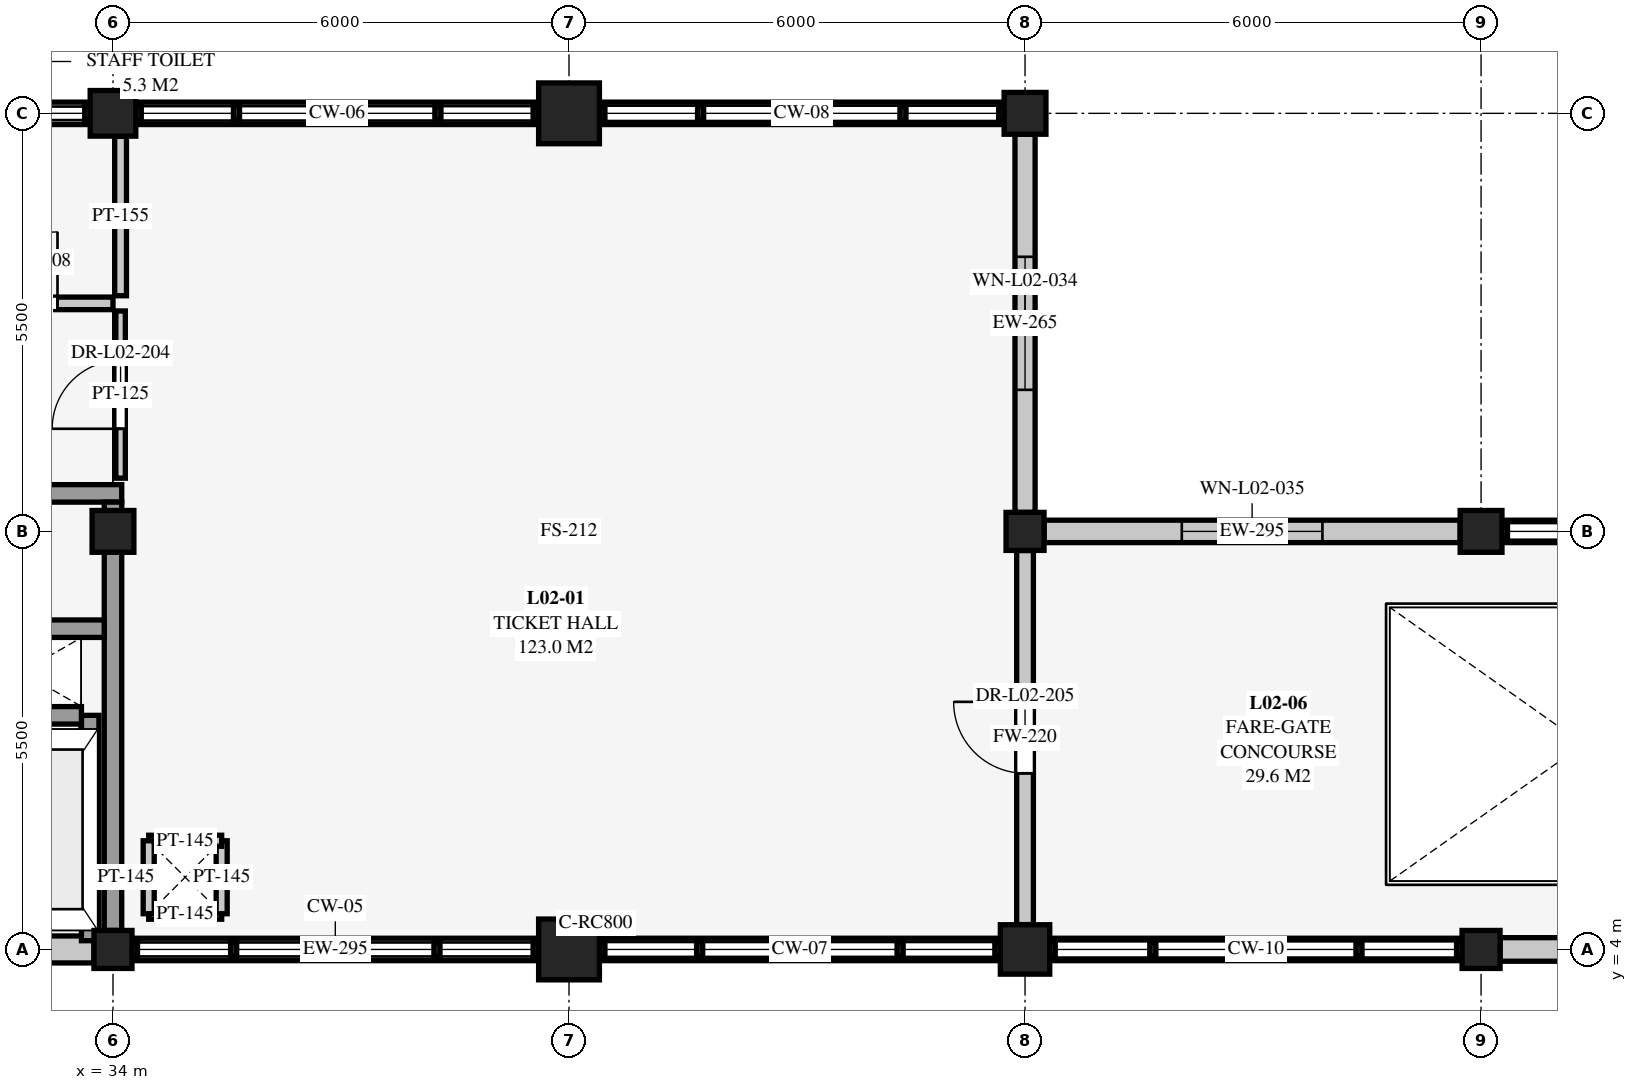
"""IFC4 building model, lengths in metres.
Left out: names, types, materials, properties, quantities, classifications, styles, units other than length and angle.
Written with IfcOpenShell. Run it as: python <this file> out.ifc"""

import sys

from ifc_helpers import new_model, si_unit, direction, frame, frame_2d, origin, origin_2d, place, context, subcontext, project, spatial, rectangle, extrude, element, fill, save


model = new_model("IFC4")
c1 = context("Model", 3, precision=1e-05, world=origin(), true_north=direction((0.0, 1.0)))
c2 = subcontext(c1, "Body", "Model", "MODEL_VIEW")
j1 = project(units=[si_unit("LENGTHUNIT", "METRE"), si_unit("PLANEANGLEUNIT", "RADIAN")], contexts=[c1])
p1 = place(None, origin())
s1 = spatial("IfcSite", under=j1, at=p1, CompositionType="ELEMENT")
p2 = place(p1, origin())
s2 = spatial("IfcBuilding", under=s1, at=p2, CompositionType="ELEMENT")
p3 = place(p2, frame((0.0, 0.0, 4.5)))
s3 = spatial("IfcBuildingStorey", under=s2, at=p3, CompositionType="ELEMENT", Elevation=4.5)
p4 = place(p3, frame((34.0, 4.0, 0.0), z_axis=(0.0, 0.0, 1.0), x_axis=(1.0, 0.0, 0.0)))
e1 = element("IfcColumn", 1, at=p4, inside=s3, PredefinedType="COLUMN", context=c2, shape_type="SweptSolid", body=[
    extrude(rectangle(XDim=0.5, YDim=0.5, at=origin_2d()), origin(), (0.0, 0.0, 1.0), 4.5),
])
p5 = place(p3, frame((34.0, 9.5, 0.0), z_axis=(0.0, 0.0, 1.0), x_axis=(1.0, 0.0, 0.0)))
e2 = element("IfcColumn", 2, at=p5, inside=s3, PredefinedType="COLUMN", context=c2, shape_type="SweptSolid", body=[
    extrude(rectangle(XDim=0.55, YDim=0.55, at=origin_2d()), origin(), (0.0, 0.0, 1.0), 4.5),
])
p6 = place(p3, frame((34.0, 15.0, 0.0), z_axis=(0.0, 0.0, 1.0), x_axis=(1.0, 0.0, 0.0)))
e3 = element("IfcColumn", 3, at=p6, inside=s3, PredefinedType="COLUMN", context=c2, shape_type="SweptSolid", body=[
    extrude(rectangle(XDim=0.6, YDim=0.6, at=origin_2d()), origin(), (0.0, 0.0, 1.0), 4.5),
])
for number, where, z_axis, x_axis in (
    (4, (40.0, 4.0, 0.0), (0.0, 0.0, 1.0), (1.0, 0.0, 0.0)),
    (5, (40.0, 15.0, 0.0), (0.0, 0.0, 1.0), (1.0, 0.0, 0.0)),
):
    element("IfcColumn", number, at=place(p3, frame(where, z_axis=z_axis, x_axis=x_axis)), inside=s3, PredefinedType="COLUMN", context=c2, shape_type="SweptSolid", body=[
        extrude(rectangle(XDim=0.8, YDim=0.8, at=origin_2d()), origin(), (0.0, 0.0, 1.0), 4.5),
    ])
p7 = place(p3, frame((46.0, 4.0, 0.0), z_axis=(0.0, 0.0, 1.0), x_axis=(1.0, 0.0, 0.0)))
e6 = element("IfcColumn", 6, at=p7, inside=s3, PredefinedType="COLUMN", context=c2, shape_type="SweptSolid", body=[
    extrude(rectangle(XDim=0.65, YDim=0.65, at=origin_2d()), origin(), (0.0, 0.0, 1.0), 4.5),
])
p8 = place(p3, frame((46.0, 9.5, 0.0), z_axis=(0.0, 0.0, 1.0), x_axis=(1.0, 0.0, 0.0)))
e7 = element("IfcColumn", 7, at=p8, inside=s3, PredefinedType="COLUMN", context=c2, shape_type="SweptSolid", body=[
    extrude(rectangle(XDim=0.5, YDim=0.5, at=origin_2d()), origin(), (0.0, 0.0, 1.0), 4.5),
])
p9 = place(p3, frame((46.0, 15.0, 0.0), z_axis=(0.0, 0.0, 1.0), x_axis=(1.0, 0.0, 0.0)))
e8 = element("IfcColumn", 8, at=p9, inside=s3, PredefinedType="COLUMN", context=c2, shape_type="SweptSolid", body=[
    extrude(rectangle(XDim=0.55, YDim=0.55, at=origin_2d()), origin(), (0.0, 0.0, 1.0), 4.5),
])
p10 = place(p3, frame((52.0, 4.0, 0.0), z_axis=(0.0, 0.0, 1.0), x_axis=(1.0, 0.0, 0.0)))
e9 = element("IfcColumn", 9, at=p10, inside=s3, PredefinedType="COLUMN", context=c2, shape_type="SweptSolid", body=[
    extrude(rectangle(XDim=0.5, YDim=0.5, at=origin_2d()), origin(), (0.0, 0.0, 1.0), 4.5),
])
p11 = place(p3, frame((52.0, 9.5, 0.0), z_axis=(0.0, 0.0, 1.0), x_axis=(1.0, 0.0, 0.0)))
e10 = element("IfcColumn", 10, at=p11, inside=s3, PredefinedType="COLUMN", context=c2, shape_type="SweptSolid", body=[
    extrude(rectangle(XDim=0.55, YDim=0.55, at=origin_2d()), origin(), (0.0, 0.0, 1.0), 4.5),
])
p12 = place(p3, frame((33.75, 4.0, 0.0), z_axis=(0.0, 0.0, 1.0), x_axis=(-1.0, 0.0, 0.0)))
e11 = element("IfcWall", 11, at=p12, inside=s3, PredefinedType="SOLIDWALL", context=c2, shape_type="SweptSolid", body=[
    extrude(rectangle(XDim=5.425, YDim=0.355, at=frame_2d((2.712, 0.0))), origin(), (0.0, 0.0, 1.0), 3.809),
])
p13 = place(p3, frame((28.275, 15.0, 0.0), z_axis=(0.0, 0.0, 1.0), x_axis=(1.0, 0.0, 0.0)))
e12 = element("IfcWall", 12, at=p13, inside=s3, PredefinedType="SOLIDWALL", context=c2, shape_type="SweptSolid", body=[
    extrude(rectangle(XDim=5.425, YDim=0.295, at=frame_2d((2.712, 0.0))), origin(), (0.0, 0.0, 1.0), 0.31),
])
p14 = place(p3, frame((39.6, 4.0, 0.0), z_axis=(0.0, 0.0, 1.0), x_axis=(-1.0, 0.0, 0.0)))
e13 = element("IfcWall", 13, at=p14, inside=s3, PredefinedType="SOLIDWALL", context=c2, shape_type="SweptSolid", body=[
    extrude(rectangle(XDim=5.35, YDim=0.295, at=frame_2d((2.675, 0.0))), origin(), (0.0, 0.0, 1.0), 0.36),
])
p15 = place(p3, frame((34.3, 15.0, 0.0), z_axis=(0.0, 0.0, 1.0), x_axis=(1.0, 0.0, 0.0)))
e14 = element("IfcWall", 14, at=p15, inside=s3, PredefinedType="SOLIDWALL", context=c2, shape_type="SweptSolid", body=[
    extrude(rectangle(XDim=5.3, YDim=0.295, at=frame_2d((2.65, 0.0))), origin(), (0.0, 0.0, 1.0), 0.41),
])
p16 = place(p3, frame((45.675, 4.0, 0.0), z_axis=(0.0, 0.0, 1.0), x_axis=(-1.0, 0.0, 0.0)))
e15 = element("IfcWall", 15, at=p16, inside=s3, PredefinedType="SOLIDWALL", context=c2, shape_type="SweptSolid", body=[
    extrude(rectangle(XDim=5.275, YDim=0.295, at=frame_2d((2.638, 0.0))), origin(), (0.0, 0.0, 1.0), 0.46),
])
p17 = place(p3, frame((40.4, 15.0, 0.0), z_axis=(0.0, 0.0, 1.0), x_axis=(1.0, 0.0, 0.0)))
e16 = element("IfcWall", 16, at=p17, inside=s3, PredefinedType="SOLIDWALL", context=c2, shape_type="SweptSolid", body=[
    extrude(rectangle(XDim=5.325, YDim=0.295, at=frame_2d((2.663, 0.0))), origin(), (0.0, 0.0, 1.0), 0.52),
])
p18 = place(p3, frame((46.0, 14.725, 0.0), z_axis=(0.0, 0.0, 1.0), x_axis=(0.0, -1.0, 0.0)))
e17 = element("IfcWall", 17, at=p18, inside=s3, PredefinedType="SOLIDWALL", context=c2, shape_type="SweptSolid", body=[
    extrude(rectangle(XDim=4.975, YDim=0.265, at=frame_2d((2.488, 0.0))), origin(), (0.0, 0.0, 1.0), 3.809),
])
p19 = place(p18, frame((1.613, 0.0, 0.75)))
e18 = element("IfcOpeningElement", 18, at=p19, cuts=e17, PredefinedType="OPENING", context=c2, shape_type="SweptSolid", body=[
    extrude(rectangle(XDim=1.75, YDim=2.3, at=frame_2d((0.875, 1.15))), frame((0.0, 0.142, 0.0), z_axis=(0.0, -1.0, 0.0), x_axis=(1.0, 0.0, 0.0)), (0.0, 0.0, 1.0), 0.285),
])
p20 = place(p3, frame((51.75, 4.0, 0.0), z_axis=(0.0, 0.0, 1.0), x_axis=(-1.0, 0.0, 0.0)))
e19 = element("IfcWall", 19, at=p20, inside=s3, PredefinedType="SOLIDWALL", context=c2, shape_type="SweptSolid", body=[
    extrude(rectangle(XDim=5.425, YDim=0.295, at=frame_2d((2.712, 0.0))), origin(), (0.0, 0.0, 1.0), 0.21),
])
p21 = place(p3, frame((46.25, 9.5, 0.0), z_axis=(0.0, 0.0, 1.0), x_axis=(1.0, 0.0, 0.0)))
e20 = element("IfcWall", 20, at=p21, inside=s3, PredefinedType="SOLIDWALL", context=c2, shape_type="SweptSolid", body=[
    extrude(rectangle(XDim=5.475, YDim=0.295, at=frame_2d((2.738, 0.0))), origin(), (0.0, 0.0, 1.0), 3.809),
])
p22 = place(p21, frame((1.812, 0.0, 0.7)))
e21 = element("IfcOpeningElement", 21, at=p22, cuts=e20, PredefinedType="OPENING", context=c2, shape_type="SweptSolid", body=[
    extrude(rectangle(XDim=1.85, YDim=2.35, at=frame_2d((0.925, 1.175))), frame((0.0, 0.157, 0.0), z_axis=(0.0, -1.0, 0.0), x_axis=(1.0, 0.0, 0.0)), (0.0, 0.0, 1.0), 0.315),
])
p23 = place(p3, frame((57.675, 4.0, 0.0), z_axis=(0.0, 0.0, 1.0), x_axis=(-1.0, 0.0, 0.0)))
e22 = element("IfcWall", 22, at=p23, inside=s3, PredefinedType="SOLIDWALL", context=c2, shape_type="SweptSolid", body=[
    extrude(rectangle(XDim=5.425, YDim=0.31, at=frame_2d((2.712, 0.0))), origin(), (0.0, 0.0, 1.0), 3.857),
])
p24 = place(p23, frame((1.738, 0.0, 0.7)))
e23 = element("IfcOpeningElement", 23, at=p24, cuts=e22, PredefinedType="OPENING", context=c2, shape_type="SweptSolid", body=[
    extrude(rectangle(XDim=1.95, YDim=2.35, at=frame_2d((0.975, 1.175))), frame((0.0, 0.165, 0.0), z_axis=(0.0, -1.0, 0.0), x_axis=(1.0, 0.0, 0.0)), (0.0, 0.0, 1.0), 0.33),
])
p25 = place(p3, frame((52.275, 9.5, 0.0), z_axis=(0.0, 0.0, 1.0), x_axis=(1.0, 0.0, 0.0)))
e24 = element("IfcWall", 24, at=p25, inside=s3, PredefinedType="SOLIDWALL", context=c2, shape_type="SweptSolid", body=[
    extrude(rectangle(XDim=5.475, YDim=0.295, at=frame_2d((2.738, 0.0))), origin(), (0.0, 0.0, 1.0), 0.26),
])
for number, where, z_axis, x_axis in (
    (25, (34.47, 4.47, 0.0), (0.0, 0.0, 1.0), (1.0, 0.0, 0.0)),
    (26, (35.43, 4.47, 0.0), (0.0, 0.0, 1.0), (0.0, 1.0, 0.0)),
    (27, (35.43, 5.43, 0.0), (0.0, 0.0, 1.0), (-1.0, 0.0, 0.0)),
    (28, (34.47, 5.43, 0.0), (0.0, 0.0, 1.0), (0.0, -1.0, 0.0)),
):
    element("IfcWall", number, at=place(p3, frame(where, z_axis=z_axis, x_axis=x_axis)), inside=s3, PredefinedType="PARTITIONING", context=c2, shape_type="SweptSolid", body=[
        extrude(rectangle(XDim=0.96, YDim=0.145, at=frame_2d((0.48, 0.0))), origin(), (0.0, 0.0, 1.0), 4.216),
    ])
p26 = place(p3, frame((28.0, 10.0, 0.0), z_axis=(0.0, 0.0, 1.0), x_axis=(1.0, 0.0, 0.0)))
e29 = element("IfcWall", 29, at=p26, inside=s3, PredefinedType="SHEAR", context=c2, shape_type="SweptSolid", body=[
    extrude(rectangle(XDim=6.115, YDim=0.23, at=frame_2d((3.058, 0.0))), origin(), (0.0, 0.0, 1.0), 4.216),
])
p27 = place(p26, frame((1.66, 0.0, 0.0)))
e30 = element("IfcOpeningElement", 30, at=p27, cuts=e29, PredefinedType="OPENING", context=c2, shape_type="SweptSolid", body=[
    extrude(rectangle(XDim=1.38, YDim=2.16, at=frame_2d((0.69, 1.08))), frame((0.0, 0.125, 0.0), z_axis=(0.0, -1.0, 0.0), x_axis=(1.0, 0.0, 0.0)), (0.0, 0.0, 1.0), 0.25),
])
p28 = place(p3, frame((34.0, 4.25, 0.0), z_axis=(0.0, 0.0, 1.0), x_axis=(0.0, 1.0, 0.0)))
e31 = element("IfcWall", 31, at=p28, inside=s3, PredefinedType="SHEAR", context=c2, shape_type="SweptSolid", body=[
    extrude(rectangle(XDim=5.635, YDim=0.23, at=frame_2d((2.817, 0.0))), origin(), (0.0, 0.0, 1.0), 4.216),
])
p29 = place(p3, frame((32.005, 4.42, 0.0), z_axis=(0.0, 0.0, 1.0), x_axis=(1.0, 0.0, 0.0)))
e32 = element("IfcWall", 32, at=p29, inside=s3, PredefinedType="SHEAR", context=c2, shape_type="SweptSolid", body=[
    extrude(rectangle(XDim=1.58, YDim=0.23, at=frame_2d((0.79, 0.0))), origin(), (0.0, 0.0, 1.0), 4.5),
])
p30 = place(p3, frame((33.7, 4.115, 0.0), z_axis=(0.0, 0.0, 1.0), x_axis=(0.0, 1.0, 0.0)))
e33 = element("IfcWall", 33, at=p30, inside=s3, PredefinedType="SHEAR", context=c2, shape_type="SweptSolid", body=[
    extrude(rectangle(XDim=2.965, YDim=0.23, at=frame_2d((1.482, 0.0))), origin(), (0.0, 0.0, 1.0), 4.5),
])
p31 = place(p3, frame((32.005, 7.08, 0.0), z_axis=(0.0, 0.0, 1.0), x_axis=(1.0, 0.0, 0.0)))
e34 = element("IfcWall", 34, at=p31, inside=s3, PredefinedType="SHEAR", context=c2, shape_type="SweptSolid", body=[
    extrude(rectangle(XDim=1.58, YDim=0.23, at=frame_2d((0.79, 0.0))), origin(), (0.0, 0.0, 1.0), 4.5),
])
p32 = place(p3, frame((32.005, 8.22, 0.0), z_axis=(0.0, 0.0, 1.0), x_axis=(1.0, 0.0, 0.0)))
e35 = element("IfcWall", 35, at=p32, inside=s3, PredefinedType="SHEAR", context=c2, shape_type="SweptSolid", body=[
    extrude(rectangle(XDim=1.88, YDim=0.23, at=frame_2d((0.94, 0.0))), origin(), (0.0, 0.0, 1.0), 4.216),
])
p33 = place(p3, frame((34.1, 10.2, 0.0), z_axis=(0.0, 0.0, 1.0), x_axis=(0.0, 1.0, 0.0)))
e36 = element("IfcWall", 36, at=p33, inside=s3, PredefinedType="PARTITIONING", context=c2, shape_type="SweptSolid", body=[
    extrude(rectangle(XDim=2.2, YDim=0.125, at=frame_2d((1.1, 0.0))), origin(), (0.0, 0.0, 1.0), 4.216),
])
p34 = place(p33, frame((0.65, 0.0, 0.0)))
e37 = element("IfcOpeningElement", 37, at=p34, cuts=e36, PredefinedType="OPENING", context=c2, shape_type="SweptSolid", body=[
    extrude(rectangle(XDim=0.9, YDim=2.1, at=frame_2d((0.45, 1.05))), frame((0.0, 0.073, 0.0), z_axis=(0.0, -1.0, 0.0), x_axis=(1.0, 0.0, 0.0)), (0.0, 0.0, 1.0), 0.145),
])
p35 = place(p3, frame((34.1, 12.6, 0.0), z_axis=(0.0, 0.0, 1.0), x_axis=(0.0, 1.0, 0.0)))
e38 = element("IfcWall", 38, at=p35, inside=s3, PredefinedType="PARTITIONING", context=c2, shape_type="SweptSolid", body=[
    extrude(rectangle(XDim=2.098, YDim=0.155, at=frame_2d((1.049, 0.0))), origin(), (0.0, 0.0, 1.0), 4.216),
])
p36 = place(p3, frame((46.0, 4.327, 0.0), z_axis=(0.0, 0.0, 1.0), x_axis=(0.0, 1.0, 0.0)))
e39 = element("IfcWall", 39, at=p36, inside=s3, PredefinedType="SOLIDWALL", context=c2, shape_type="SweptSolid", body=[
    extrude(rectangle(XDim=4.921, YDim=0.22, at=frame_2d((2.46, 0.0))), origin(), (0.0, 0.0, 1.0), 3.862),
])
p37 = place(p36, frame((1.99, 0.0, 0.0)))
e40 = element("IfcOpeningElement", 40, at=p37, cuts=e39, PredefinedType="OPENING", context=c2, shape_type="SweptSolid", body=[
    extrude(rectangle(XDim=0.94, YDim=2.1, at=frame_2d((0.47, 1.05))), frame((0.0, 0.12, 0.0), z_axis=(0.0, -1.0, 0.0), x_axis=(1.0, 0.0, 0.0)), (0.0, 0.0, 1.0), 0.24),
])
p38 = place(p3, frame((31.6, 12.5, 0.0), z_axis=(0.0, 0.0, 1.0), x_axis=(1.0, 0.0, 0.0)))
e41 = element("IfcWall", 41, at=p38, inside=s3, PredefinedType="PARTITIONING", context=c2, shape_type="SweptSolid", body=[
    extrude(rectangle(XDim=2.4, YDim=0.165, at=frame_2d((1.2, 0.0))), origin(), (0.0, 0.0, 1.0), 4.216),
])
p39 = place(p38, frame((0.73, 0.0, 0.0)))
e42 = element("IfcOpeningElement", 42, at=p39, cuts=e41, PredefinedType="OPENING", context=c2, shape_type="SweptSolid", body=[
    extrude(rectangle(XDim=0.94, YDim=2.1, at=frame_2d((0.47, 1.05))), frame((0.0, 0.093, 0.0), z_axis=(0.0, -1.0, 0.0), x_axis=(1.0, 0.0, 0.0)), (0.0, 0.0, 1.0), 0.185),
])
p40 = place(p19, origin())
e43 = element("IfcWindow", 43, at=p40, inside=s3, PartitioningType="SINGLE_PANEL", PredefinedType="WINDOW", context=c2, shape_type="SweptSolid", body=[
    extrude(rectangle(XDim=1.75, YDim=2.3, at=frame_2d((0.875, 1.15))), frame((0.0, 0.03, 0.0), z_axis=(0.0, -1.0, 0.0), x_axis=(1.0, 0.0, 0.0)), (0.0, 0.0, 1.0), 0.06),
])
fill(e18, e43)
p41 = place(p22, origin())
e44 = element("IfcWindow", 44, at=p41, inside=s3, PartitioningType="SINGLE_PANEL", PredefinedType="WINDOW", context=c2, shape_type="SweptSolid", body=[
    extrude(rectangle(XDim=1.85, YDim=2.35, at=frame_2d((0.925, 1.175))), frame((0.0, 0.03, 0.0), z_axis=(0.0, -1.0, 0.0), x_axis=(1.0, 0.0, 0.0)), (0.0, 0.0, 1.0), 0.06),
])
fill(e21, e44)
p42 = place(p34, origin())
e45 = element("IfcDoor", 45, at=p42, inside=s3, OperationType="SINGLE_SWING_LEFT", PredefinedType="DOOR", context=c2, shape_type="SweptSolid", body=[
    extrude(rectangle(XDim=0.9, YDim=2.1, at=frame_2d((0.45, 1.05))), frame((0.0, 0.025, 0.0), z_axis=(0.0, -1.0, 0.0), x_axis=(1.0, 0.0, 0.0)), (0.0, 0.0, 1.0), 0.05),
])
fill(e37, e45)
p43 = place(p37, origin())
e46 = element("IfcDoor", 46, at=p43, inside=s3, OperationType="SINGLE_SWING_RIGHT", PredefinedType="DOOR", context=c2, shape_type="SweptSolid", body=[
    extrude(rectangle(XDim=0.94, YDim=2.1, at=frame_2d((0.47, 1.05))), frame((0.0, 0.025, 0.0), z_axis=(0.0, -1.0, 0.0), x_axis=(1.0, 0.0, 0.0)), (0.0, 0.0, 1.0), 0.05),
])
fill(e40, e46)
p44 = place(p39, origin())
e47 = element("IfcDoor", 47, at=p44, inside=s3, OperationType="SINGLE_SWING_RIGHT", PredefinedType="DOOR", context=c2, shape_type="SweptSolid", body=[
    extrude(rectangle(XDim=0.94, YDim=2.1, at=frame_2d((0.47, 1.05))), frame((0.0, 0.025, 0.0), z_axis=(0.0, -1.0, 0.0), x_axis=(1.0, 0.0, 0.0)), (0.0, 0.0, 1.0), 0.05),
])
fill(e42, e47)
save(model, sys.argv[1])
